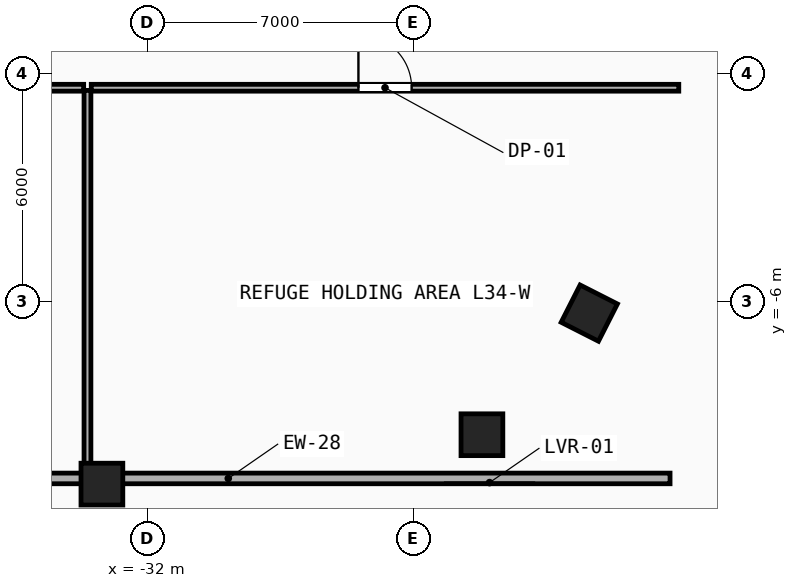
"""IFC4 building model, lengths in metres.
Left out: names, types, materials, properties, quantities, classifications, styles, units other than length and angle.
Written with IfcOpenShell. Run it as: python <this file> out.ifc"""

import sys

from ifc_helpers import new_model, si_unit, direction, frame, frame_2d, origin, origin_2d, place, context, subcontext, project, spatial, rectangle, extrude, element, fill, save


model = new_model("IFC4")
c1 = context("Model", 3, precision=1e-05, world=origin(), true_north=direction((0.0, 1.0)))
c2 = subcontext(c1, "Body", "Model", "MODEL_VIEW")
j1 = project(units=[si_unit("LENGTHUNIT", "METRE"), si_unit("PLANEANGLEUNIT", "RADIAN")], contexts=[c1])
p1 = place(None, origin())
s1 = spatial("IfcSite", under=j1, at=p1, CompositionType="ELEMENT")
p2 = place(p1, origin())
s2 = spatial("IfcBuilding", under=s1, at=p2, CompositionType="ELEMENT")
p3 = place(p2, frame((0.0, 0.0, 132.2)))
s3 = spatial("IfcBuildingStorey", under=s2, at=p3, CompositionType="ELEMENT", Elevation=132.2)
for number, where, z_axis, x_axis in (
    (1, (-33.2, -10.8, 0.0), (0.0, 0.0, 1.0), (1.0, 0.0, 0.0)),
    (2, (-23.2, -9.5, 0.0), (0.0, 0.0, 1.0), (1.0, 0.0, 0.0)),
    (3, (-20.375, -6.3, 0.0), (0.0, 0.0, 1.0), (0.453, 0.892, 0.0)),
):
    element("IfcColumn", number, at=place(p3, frame(where, z_axis=z_axis, x_axis=x_axis)), inside=s3, PredefinedType="COLUMN", context=c2, shape_type="SweptSolid", body=[
        extrude(rectangle(XDim=1.1, YDim=1.1, at=origin_2d()), origin(), (0.0, 0.0, 1.0), 4.6),
    ])
p4 = place(p3, frame((-41.5, -10.65, 0.0), z_axis=(0.0, 0.0, 1.0), x_axis=(1.0, 0.0, 0.0)))
e4 = element("IfcWall", 4, at=p4, inside=s3, PredefinedType="SOLIDWALL", context=c2, shape_type="SweptSolid", body=[
    extrude(rectangle(XDim=23.25, YDim=0.28, at=frame_2d((11.625, 0.0))), origin(), (0.0, 0.0, 1.0), 3.665),
])
p5 = place(p4, frame((0.85, 0.0, 0.0)))
e5 = element("IfcOpeningElement", 5, at=p5, cuts=e4, PredefinedType="OPENING", context=c2, shape_type="SweptSolid", body=[
    extrude(rectangle(XDim=1.1, YDim=2.2, at=frame_2d((0.55, 1.1))), frame((0.0, 0.15, 0.0), z_axis=(0.0, -1.0, 0.0), x_axis=(1.0, 0.0, 0.0)), (0.0, 0.0, 1.0), 0.3),
])
p6 = place(p4, frame((3.1, 0.0, 0.9)))
e6 = element("IfcOpeningElement", 6, at=p6, cuts=e4, PredefinedType="OPENING", context=c2, shape_type="SweptSolid", body=[
    extrude(rectangle(XDim=1.5, YDim=1.8, at=frame_2d((0.75, 0.9))), frame((0.0, 0.15, 0.0), z_axis=(0.0, -1.0, 0.0), x_axis=(1.0, 0.0, 0.0)), (0.0, 0.0, 1.0), 0.3),
])
p7 = place(p4, frame((5.45, 0.0, 0.9)))
e7 = element("IfcOpeningElement", 7, at=p7, cuts=e4, PredefinedType="OPENING", context=c2, shape_type="SweptSolid", body=[
    extrude(rectangle(XDim=1.5, YDim=1.8, at=frame_2d((0.75, 0.9))), frame((0.0, 0.15, 0.0), z_axis=(0.0, -1.0, 0.0), x_axis=(1.0, 0.0, 0.0)), (0.0, 0.0, 1.0), 0.3),
])
p8 = place(p3, frame((-33.48, -0.37, 0.0), z_axis=(0.0, 0.0, 1.0), x_axis=(1.0, 0.0, 0.0)))
e8 = element("IfcWall", 8, at=p8, inside=s3, PredefinedType="PARTITIONING", context=c2, shape_type="SweptSolid", body=[
    extrude(rectangle(XDim=15.46, YDim=0.18, at=frame_2d((7.73, 0.0))), origin(), (0.0, 0.0, 1.0), 4.36),
])
p9 = place(p8, frame((7.03, 0.0, 0.0)))
e9 = element("IfcOpeningElement", 9, at=p9, cuts=e8, PredefinedType="OPENING", context=c2, shape_type="SweptSolid", body=[
    extrude(rectangle(XDim=1.4, YDim=2.2, at=frame_2d((0.7, 1.1))), frame((0.0, 0.1, 0.0), z_axis=(0.0, -1.0, 0.0), x_axis=(1.0, 0.0, 0.0)), (0.0, 0.0, 1.0), 0.2),
])
p10 = place(p3, frame((-41.659, -0.37, 0.0), z_axis=(0.0, 0.0, 1.0), x_axis=(1.0, 0.0, 0.0)))
e10 = element("IfcWall", 10, at=p10, inside=s3, PredefinedType="PARTITIONING", context=c2, shape_type="SweptSolid", body=[
    extrude(rectangle(XDim=7.979, YDim=0.18, at=frame_2d((3.989, 0.0))), origin(), (0.0, 0.0, 1.0), 4.36),
])
p11 = place(p10, frame((3.289, 0.0, 0.0)))
e11 = element("IfcOpeningElement", 11, at=p11, cuts=e10, PredefinedType="OPENING", context=c2, shape_type="SweptSolid", body=[
    extrude(rectangle(XDim=1.4, YDim=2.2, at=frame_2d((0.7, 1.1))), frame((0.0, 0.1, 0.0), z_axis=(0.0, -1.0, 0.0), x_axis=(1.0, 0.0, 0.0)), (0.0, 0.0, 1.0), 0.2),
])
p12 = place(p3, frame((-33.58, -10.6, 0.0), z_axis=(0.0, 0.0, 1.0), x_axis=(0.0, 1.0, 0.0)))
e12 = element("IfcWall", 12, at=p12, inside=s3, PredefinedType="PARTITIONING", context=c2, shape_type="SweptSolid", body=[
    extrude(rectangle(XDim=10.16, YDim=0.18, at=frame_2d((5.08, 0.0))), origin(), (0.0, 0.0, 1.0), 4.36),
])
p13 = place(p9, origin())
e13 = element("IfcDoor", 13, at=p13, inside=s3, OperationType="SINGLE_SWING_LEFT", PredefinedType="DOOR", context=c2, shape_type="SweptSolid", body=[
    extrude(rectangle(XDim=1.4, YDim=2.2, at=frame_2d((0.7, 1.1))), frame((0.0, 0.025, 0.0), z_axis=(0.0, -1.0, 0.0), x_axis=(1.0, 0.0, 0.0)), (0.0, 0.0, 1.0), 0.05),
])
fill(e9, e13)
save(model, sys.argv[1])
